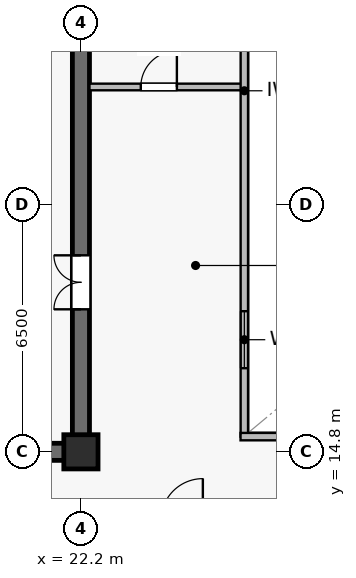
"""IFC4 building model, lengths in metres.
Left out: names, types, materials, properties, quantities, classifications, styles, units other than length and angle.
Written with IfcOpenShell. Run it as: python <this file> out.ifc"""

import sys

from ifc_helpers import new_model, si_unit, direction, frame, frame_2d, origin, origin_2d, place, context, subcontext, project, spatial, rectangle, extrude, source, transform, mapped, element, fill, save


model = new_model("IFC4")
c1 = context("Model", 3, precision=1e-05, world=origin(), true_north=direction((0.0, 1.0)))
c2 = subcontext(c1, "Body", "Model", "MODEL_VIEW")
j1 = project(units=[si_unit("LENGTHUNIT", "METRE"), si_unit("PLANEANGLEUNIT", "RADIAN")], contexts=[c1])
p1 = place(None, origin())
s1 = spatial("IfcSite", under=j1, at=p1, CompositionType="ELEMENT")
p2 = place(p1, origin())
s2 = spatial("IfcBuilding", under=s1, at=p2, CompositionType="ELEMENT")
p3 = place(p2, frame((0.0, 0.0, 318.6)))
s3 = spatial("IfcBuildingStorey", under=s2, at=p3, CompositionType="ELEMENT", Elevation=318.6)
p4 = place(p3, frame((7.175, 14.8, 0.0), z_axis=(0.0, 0.0, 1.0), x_axis=(1.0, 0.0, 0.0)))
e1 = element("IfcWall", 1, at=p4, inside=s3, PredefinedType="SHEAR", context=c2, shape_type="SweptSolid", body=[
    extrude(rectangle(XDim=15.25, YDim=0.45, at=frame_2d((7.625, 0.0))), origin(), (0.0, 0.0, 1.0), 3.9),
])
p5 = place(p3, frame((22.2, 15.025, 0.0), z_axis=(0.0, 0.0, 1.0), x_axis=(0.0, 1.0, 0.0)))
e2 = element("IfcWall", 2, at=p5, inside=s3, PredefinedType="SHEAR", context=c2, shape_type="SweptSolid", body=[
    extrude(rectangle(XDim=18.55, YDim=0.45, at=frame_2d((9.275, 0.0))), origin(), (0.0, 0.0, 1.0), 3.9),
])
p6 = place(p5, frame((3.525, 0.0, 0.0)))
e3 = element("IfcOpeningElement", 3, at=p6, cuts=e2, PredefinedType="OPENING", context=c2, shape_type="SweptSolid", body=[
    extrude(rectangle(XDim=1.42, YDim=2.2, at=frame_2d((0.71, 1.1))), frame((0.0, 0.235, 0.0), z_axis=(0.0, -1.0, 0.0), x_axis=(1.0, 0.0, 0.0)), (0.0, 0.0, 1.0), 0.47),
])
m1 = source(origin(), c2, "Body", "SweptSolid", [
    extrude(rectangle(XDim=0.9, YDim=0.9, at=origin_2d()), origin(), (0.0, 0.0, 1.0), 4.2),
])
p7 = place(p3, frame((22.2, 14.8, 0.0), z_axis=(0.0, 0.0, 1.0), x_axis=(1.0, 0.0, 0.0)))
e4 = element("IfcColumn", 4, at=p7, inside=s3, PredefinedType="COLUMN", context=c2, shape_type="MappedRepresentation", body=[
    mapped(m1, transform((0.0, 0.0, 0.0), scale=1.0)),
])
p8 = place(p3, frame((22.425, 24.4, 0.0), z_axis=(0.0, 0.0, 1.0), x_axis=(1.0, 0.0, 0.0)))
e5 = element("IfcWall", 5, at=p8, inside=s3, PredefinedType="PARTITIONING", context=c2, shape_type="SweptSolid", body=[
    extrude(rectangle(XDim=4.075, YDim=0.175, at=frame_2d((2.038, 0.0))), origin(), (0.0, 0.0, 1.0), 3.9),
])
p9 = place(p8, frame((1.35, 0.0, 0.0)))
e6 = element("IfcOpeningElement", 6, at=p9, cuts=e5, PredefinedType="OPENING", context=c2, shape_type="SweptSolid", body=[
    extrude(rectangle(XDim=0.95, YDim=2.15, at=frame_2d((0.475, 1.075))), frame((0.0, 0.098, 0.0), z_axis=(0.0, -1.0, 0.0), x_axis=(1.0, 0.0, 0.0)), (0.0, 0.0, 1.0), 0.195),
])
p10 = place(p3, frame((26.5, 15.2, 0.0), z_axis=(0.0, 0.0, 1.0), x_axis=(0.0, 1.0, 0.0)))
e7 = element("IfcWall", 7, at=p10, inside=s3, PredefinedType="SOLIDWALL", context=c2, shape_type="SweptSolid", body=[
    extrude(rectangle(XDim=18.2, YDim=0.195, at=frame_2d((9.1, 0.0))), origin(), (0.0, 0.0, 1.0), 3.9),
])
p11 = place(p10, frame((1.8, 0.0, 0.9)))
e8 = element("IfcOpeningElement", 8, at=p11, cuts=e7, PredefinedType="OPENING", context=c2, shape_type="SweptSolid", body=[
    extrude(rectangle(XDim=1.5, YDim=1.4, at=frame_2d((0.75, 0.7))), frame((0.0, 0.107, 0.0), z_axis=(0.0, -1.0, 0.0), x_axis=(1.0, 0.0, 0.0)), (0.0, 0.0, 1.0), 0.215),
])
p12 = place(p10, frame((13.2, 0.0, 0.9)))
e9 = element("IfcOpeningElement", 9, at=p12, cuts=e7, PredefinedType="OPENING", context=c2, shape_type="SweptSolid", body=[
    extrude(rectangle(XDim=1.5, YDim=1.4, at=frame_2d((0.75, 0.7))), frame((0.0, 0.107, 0.0), z_axis=(0.0, -1.0, 0.0), x_axis=(1.0, 0.0, 0.0)), (0.0, 0.0, 1.0), 0.215),
])
p13 = place(p3, frame((26.4, 15.2, 0.0), z_axis=(0.0, 0.0, 1.0), x_axis=(1.0, 0.0, 0.0)))
e10 = element("IfcWall", 10, at=p13, inside=s3, PredefinedType="SOLIDWALL", context=c2, shape_type="SweptSolid", body=[
    extrude(rectangle(XDim=22.0, YDim=0.195, at=frame_2d((11.0, 0.0))), origin(), (0.0, 0.0, 1.0), 3.9),
])
m2 = source(origin(), c2, "Body", "SweptSolid", [
    extrude(rectangle(XDim=1.5, YDim=1.4, at=frame_2d((0.75, 0.7))), frame((0.0, 0.03, 0.0), z_axis=(0.0, -1.0, 0.0), x_axis=(1.0, 0.0, 0.0)), (0.0, 0.0, 1.0), 0.06),
])
p14 = place(p11, origin())
e11 = element("IfcWindow", 11, at=p14, inside=s3, PartitioningType="SINGLE_PANEL", PredefinedType="WINDOW", context=c2, shape_type="MappedRepresentation", body=[
    mapped(m2, transform((0.0, 0.0, 0.0), scale=1.0)),
])
fill(e8, e11)
m3 = source(origin(), c2, "Body", "SweptSolid", [
    extrude(rectangle(XDim=1.42, YDim=2.2, at=frame_2d((0.71, 1.1))), frame((0.0, 0.025, 0.0), z_axis=(0.0, -1.0, 0.0), x_axis=(1.0, 0.0, 0.0)), (0.0, 0.0, 1.0), 0.05),
])
p15 = place(p6, origin())
e12 = element("IfcDoor", 12, at=p15, inside=s3, OperationType="DOUBLE_DOOR_SINGLE_SWING", PredefinedType="DOOR", context=c2, shape_type="MappedRepresentation", body=[
    mapped(m3, transform((0.0, 0.0, 0.0), scale=1.0)),
])
fill(e3, e12)
m4 = source(origin(), c2, "Body", "SweptSolid", [
    extrude(rectangle(XDim=0.95, YDim=2.15, at=frame_2d((0.475, 1.075))), frame((0.0, 0.025, 0.0), z_axis=(0.0, -1.0, 0.0), x_axis=(1.0, 0.0, 0.0)), (0.0, 0.0, 1.0), 0.05),
])
p16 = place(p9, origin())
e13 = element("IfcDoor", 13, at=p16, inside=s3, OperationType="SINGLE_SWING_RIGHT", PredefinedType="DOOR", context=c2, shape_type="MappedRepresentation", body=[
    mapped(m4, transform((0.0, 0.0, 0.0), scale=1.0)),
])
fill(e6, e13)
save(model, sys.argv[1])
